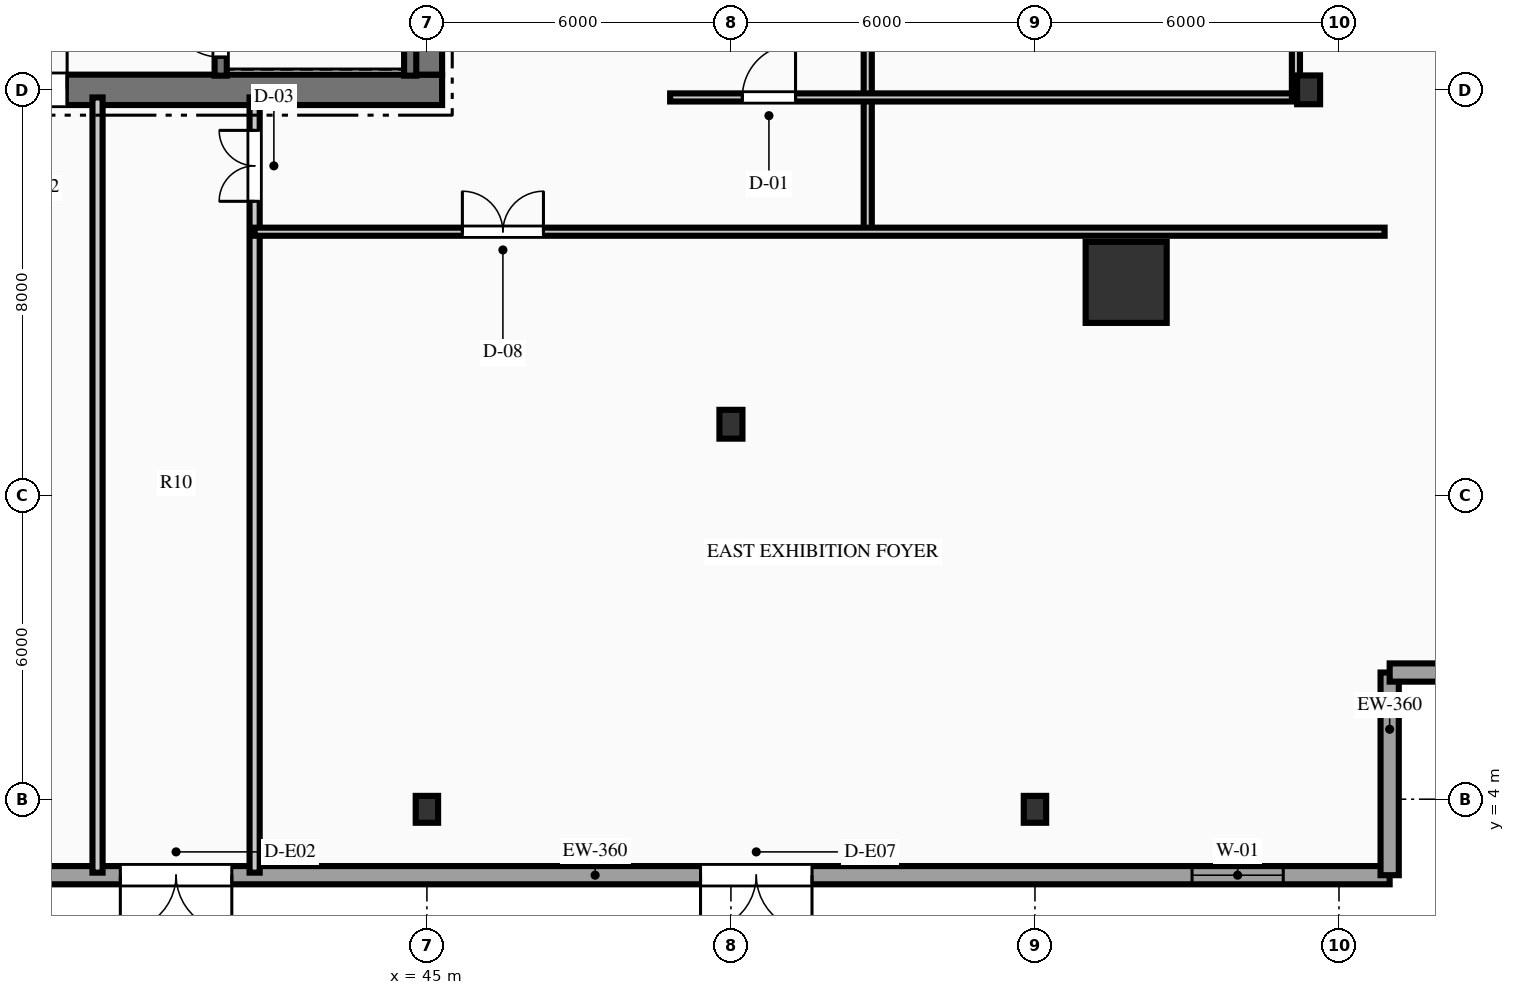
"""IFC4 building model, lengths in metres.
Left out: names, types, materials, properties, quantities, classifications, styles, units other than length and angle.
Written with IfcOpenShell. Run it as: python <this file> out.ifc"""

import sys

from ifc_helpers import new_model, si_unit, direction, frame, frame_2d, origin, origin_2d, place, context, subcontext, project, spatial, rectangle, hollow_rectangle, i_section, extrude, element, fill, save


model = new_model("IFC4")
c1 = context("Model", 3, precision=1e-05, world=origin(), true_north=direction((0.0, 1.0)))
c2 = subcontext(c1, "Body", "Model", "MODEL_VIEW")
j1 = project(units=[si_unit("LENGTHUNIT", "METRE"), si_unit("PLANEANGLEUNIT", "RADIAN")], contexts=[c1])
p1 = place(None, origin())
s1 = spatial("IfcSite", under=j1, at=p1, CompositionType="ELEMENT")
p2 = place(p1, origin())
s2 = spatial("IfcBuilding", under=s1, at=p2, CompositionType="ELEMENT")
p3 = place(p2, origin())
s3 = spatial("IfcBuildingStorey", under=s2, at=p3, CompositionType="ELEMENT", Elevation=0.0)
p4 = place(p3, frame((26.7, 18.0, 0.0), z_axis=(0.0, 0.0, 1.0), x_axis=(1.0, 0.0, 0.0)))
e1 = element("IfcWall", 1, at=p4, inside=s3, PredefinedType="SHEAR", context=c2, shape_type="SweptSolid", body=[
    extrude(rectangle(XDim=18.6, YDim=0.6, at=frame_2d((9.3, 0.0))), origin(), (0.0, 0.0, 1.0), 6.0),
])
p5 = place(p4, frame((7.4, 0.0, 0.0)))
e2 = element("IfcOpeningElement", 2, at=p5, cuts=e1, PredefinedType="OPENING", context=c2, shape_type="SweptSolid", body=[
    extrude(rectangle(XDim=1.1, YDim=2.15, at=frame_2d((0.55, 1.075))), frame((0.0, 0.31, 0.0), z_axis=(0.0, -1.0, 0.0), x_axis=(1.0, 0.0, 0.0)), (0.0, 0.0, 1.0), 0.62),
])
p6 = place(p4, frame((10.1, 0.0, 0.0)))
e3 = element("IfcOpeningElement", 3, at=p6, cuts=e1, PredefinedType="OPENING", context=c2, shape_type="SweptSolid", body=[
    extrude(rectangle(XDim=1.1, YDim=2.15, at=frame_2d((0.55, 1.075))), frame((0.0, 0.31, 0.0), z_axis=(0.0, -1.0, 0.0), x_axis=(1.0, 0.0, 0.0)), (0.0, 0.0, 1.0), 0.62),
])
p7 = place(p3, frame((45.0, 18.3, 0.0), z_axis=(0.0, 0.0, 1.0), x_axis=(0.0, 1.0, 0.0)))
e4 = element("IfcWall", 4, at=p7, inside=s3, PredefinedType="SHEAR", context=c2, shape_type="SweptSolid", body=[
    extrude(rectangle(XDim=15.4, YDim=0.6, at=frame_2d((7.7, 0.0))), origin(), (0.0, 0.0, 1.0), 6.0),
])
p8 = place(p7, frame((9.94, 0.0, 0.0)))
e5 = element("IfcOpeningElement", 5, at=p8, cuts=e4, PredefinedType="OPENING", context=c2, shape_type="SweptSolid", body=[
    extrude(rectangle(XDim=1.4, YDim=2.2, at=frame_2d((0.7, 1.1))), frame((0.0, 0.31, 0.0), z_axis=(0.0, -1.0, 0.0), x_axis=(1.0, 0.0, 0.0)), (0.0, 0.0, 1.0), 0.62),
])
p9 = place(p3, frame((40.93, 18.28, 0.0), z_axis=(0.0, 0.0, 1.0), x_axis=(0.0, 1.0, 0.0)))
e6 = element("IfcWall", 6, at=p9, inside=s3, PredefinedType="SHEAR", context=c2, shape_type="SweptSolid", body=[
    extrude(rectangle(XDim=8.26, YDim=0.24, at=frame_2d((4.13, 0.0))), origin(), (0.0, 0.0, 1.0), 6.0),
])
p10 = place(p9, frame((0.365, 0.0, 0.0)))
e7 = element("IfcOpeningElement", 7, at=p10, cuts=e6, PredefinedType="OPENING", context=c2, shape_type="SweptSolid", body=[
    extrude(rectangle(XDim=1.05, YDim=2.15, at=frame_2d((0.525, 1.075))), frame((0.0, 0.13, 0.0), z_axis=(0.0, -1.0, 0.0), x_axis=(1.0, 0.0, 0.0)), (0.0, 0.0, 1.0), 0.26),
])
p11 = place(p3, frame((44.67, 18.28, 0.0), z_axis=(0.0, 0.0, 1.0), x_axis=(0.0, 1.0, 0.0)))
e8 = element("IfcWall", 8, at=p11, inside=s3, PredefinedType="SHEAR", context=c2, shape_type="SweptSolid", body=[
    extrude(rectangle(XDim=8.26, YDim=0.24, at=frame_2d((4.13, 0.0))), origin(), (0.0, 0.0, 1.0), 6.0),
])
p12 = place(p3, frame((58.8, 14.2, 0.0), z_axis=(0.0, 0.0, 1.0), x_axis=(1.0, 0.0, 0.0)))
e9 = element("IfcColumn", 9, at=p12, inside=s3, PredefinedType="COLUMN", context=c2, shape_type="SweptSolid", body=[
    extrude(hollow_rectangle(XDim=1.6, YDim=1.6, WallThickness=0.08, at=origin_2d()), origin(), (0.0, 0.0, 1.0), 6.0),
])
for number, where, z_axis, x_axis in (
    (10, (62.4, 18.0, 0.0), (0.0, 0.0, 1.0), (1.0, 0.0, 0.0)),
    (11, (51.0, 11.4, 0.0), (0.0, 0.0, 1.0), (1.0, 0.0, 0.0)),
):
    element("IfcColumn", number, at=place(p3, frame(where, z_axis=z_axis, x_axis=x_axis)), inside=s3, PredefinedType="COLUMN", context=c2, shape_type="SweptSolid", body=[
        extrude(i_section(OverallWidth=0.454, OverallDepth=0.569, WebThickness=0.078, FlangeThickness=0.125, at=origin_2d()), origin(), (0.0, 0.0, 1.0), 6.0),
    ])
for number, where, z_axis, x_axis in (
    (12, (45.0, 3.8, 0.0), (0.0, 0.0, 1.0), (1.0, 0.0, 0.0)),
    (13, (57.0, 3.8, 0.0), (0.0, 0.0, 1.0), (1.0, 0.0, 0.0)),
):
    element("IfcColumn", number, at=place(p3, frame(where, z_axis=z_axis, x_axis=x_axis)), inside=s3, PredefinedType="PILASTER", context=c2, shape_type="SweptSolid", body=[
        extrude(i_section(OverallWidth=0.442, OverallDepth=0.531, WebThickness=0.066, FlangeThickness=0.106, at=origin_2d()), origin(), (0.0, 0.0, 1.0), 6.0),
    ])
p13 = place(p3, frame((64.0, 2.5, 0.0), z_axis=(0.0, 0.0, 1.0), x_axis=(-1.0, 0.0, 0.0)))
e14 = element("IfcWall", 14, at=p13, inside=s3, PredefinedType="STANDARD", context=c2, shape_type="SweptSolid", body=[
    extrude(rectangle(XDim=56.0, YDim=0.36, at=frame_2d((28.0, 0.0))), origin(), (0.0, 0.0, 1.0), 5.67),
])
p14 = place(p13, frame((30.95, 0.0, 0.0)))
e15 = element("IfcOpeningElement", 15, at=p14, cuts=e14, PredefinedType="OPENING", context=c2, shape_type="SweptSolid", body=[
    extrude(rectangle(XDim=2.2, YDim=2.4, at=frame_2d((1.1, 1.2))), frame((0.0, 0.19, 0.0), z_axis=(0.0, -1.0, 0.0), x_axis=(1.0, 0.0, 0.0)), (0.0, 0.0, 1.0), 0.38),
])
p15 = place(p13, frame((22.85, 0.0, 0.0)))
e16 = element("IfcOpeningElement", 16, at=p15, cuts=e14, PredefinedType="OPENING", context=c2, shape_type="SweptSolid", body=[
    extrude(rectangle(XDim=2.2, YDim=2.4, at=frame_2d((1.1, 1.2))), frame((0.0, 0.19, 0.0), z_axis=(0.0, -1.0, 0.0), x_axis=(1.0, 0.0, 0.0)), (0.0, 0.0, 1.0), 0.38),
])
p16 = place(p13, frame((42.4, 0.0, 0.0)))
e17 = element("IfcOpeningElement", 17, at=p16, cuts=e14, PredefinedType="OPENING", context=c2, shape_type="SweptSolid", body=[
    extrude(rectangle(XDim=2.2, YDim=2.4, at=frame_2d((1.1, 1.2))), frame((0.0, 0.19, 0.0), z_axis=(0.0, -1.0, 0.0), x_axis=(1.0, 0.0, 0.0)), (0.0, 0.0, 1.0), 0.38),
])
p17 = place(p13, frame((11.4, 0.0, 0.0)))
e18 = element("IfcOpeningElement", 18, at=p17, cuts=e14, PredefinedType="OPENING", context=c2, shape_type="SweptSolid", body=[
    extrude(rectangle(XDim=2.2, YDim=2.4, at=frame_2d((1.1, 1.2))), frame((0.0, 0.19, 0.0), z_axis=(0.0, -1.0, 0.0), x_axis=(1.0, 0.0, 0.0)), (0.0, 0.0, 1.0), 0.38),
])
p18 = place(p13, frame((26.8, 0.0, 0.0)))
e19 = element("IfcOpeningElement", 19, at=p18, cuts=e14, PredefinedType="OPENING", context=c2, shape_type="SweptSolid", body=[
    extrude(rectangle(XDim=2.4, YDim=2.6, at=frame_2d((1.2, 1.3))), frame((0.0, 0.19, 0.0), z_axis=(0.0, -1.0, 0.0), x_axis=(1.0, 0.0, 0.0)), (0.0, 0.0, 1.0), 0.38),
])
p19 = place(p13, frame((52.1, 0.0, 1.0)))
e20 = element("IfcOpeningElement", 20, at=p19, cuts=e14, PredefinedType="OPENING", context=c2, shape_type="SweptSolid", body=[
    extrude(rectangle(XDim=1.8, YDim=2.4, at=frame_2d((0.9, 1.2))), frame((0.0, 0.19, 0.0), z_axis=(0.0, -1.0, 0.0), x_axis=(1.0, 0.0, 0.0)), (0.0, 0.0, 1.0), 0.38),
])
p20 = place(p13, frame((2.1, 0.0, 1.0)))
e21 = element("IfcOpeningElement", 21, at=p20, cuts=e14, PredefinedType="OPENING", context=c2, shape_type="SweptSolid", body=[
    extrude(rectangle(XDim=1.8, YDim=2.4, at=frame_2d((0.9, 1.2))), frame((0.0, 0.19, 0.0), z_axis=(0.0, -1.0, 0.0), x_axis=(1.0, 0.0, 0.0)), (0.0, 0.0, 1.0), 0.38),
])
for number, where, z_axis, x_axis in (
    (22, (64.0, 6.5, 0.0), (0.0, 0.0, 1.0), (0.0, -1.0, 0.0)),
    (23, (68.0, 6.5, 0.0), (0.0, 0.0, 1.0), (-1.0, 0.0, 0.0)),
):
    element("IfcWall", number, at=place(p3, frame(where, z_axis=z_axis, x_axis=x_axis)), inside=s3, PredefinedType="STANDARD", context=c2, shape_type="SweptSolid", body=[
        extrude(rectangle(XDim=4.0, YDim=0.36, at=frame_2d((2.0, 0.0))), origin(), (0.0, 0.0, 1.0), 5.67),
    ])
p21 = place(p3, frame((38.5, 2.55, 0.0), z_axis=(0.0, 0.0, 1.0), x_axis=(0.0, 1.0, 0.0)))
e24 = element("IfcWall", 24, at=p21, inside=s3, PredefinedType="PARTITIONING", context=c2, shape_type="SweptSolid", body=[
    extrude(rectangle(XDim=15.3, YDim=0.2, at=frame_2d((7.65, 0.0))), origin(), (0.0, 0.0, 1.0), 5.67),
])
p22 = place(p3, frame((41.6, 2.55, 0.0), z_axis=(0.0, 0.0, 1.0), x_axis=(0.0, 1.0, 0.0)))
e25 = element("IfcWall", 25, at=p22, inside=s3, PredefinedType="PARTITIONING", context=c2, shape_type="SweptSolid", body=[
    extrude(rectangle(XDim=15.3, YDim=0.2, at=frame_2d((7.65, 0.0))), origin(), (0.0, 0.0, 1.0), 5.67),
])
p23 = place(p22, frame((13.25, 0.0, 0.0)))
e26 = element("IfcOpeningElement", 26, at=p23, cuts=e25, PredefinedType="OPENING", context=c2, shape_type="SweptSolid", body=[
    extrude(rectangle(XDim=1.4, YDim=2.2, at=frame_2d((0.7, 1.1))), frame((0.0, 0.11, 0.0), z_axis=(0.0, -1.0, 0.0), x_axis=(1.0, 0.0, 0.0)), (0.0, 0.0, 1.0), 0.22),
])
p24 = place(p3, frame((53.7, 15.2, 0.0), z_axis=(0.0, 0.0, 1.0), x_axis=(0.0, 1.0, 0.0)))
e27 = element("IfcWall", 27, at=p24, inside=s3, PredefinedType="PARTITIONING", context=c2, shape_type="SweptSolid", body=[
    extrude(rectangle(XDim=2.65, YDim=0.16, at=frame_2d((1.325, 0.0))), origin(), (0.0, 0.0, 1.0), 5.67),
])
p25 = place(p3, frame((53.7, 17.85, 0.0), z_axis=(0.0, 0.0, 1.0), x_axis=(0.0, 1.0, 0.0)))
e28 = element("IfcWall", 28, at=p25, inside=s3, PredefinedType="PARTITIONING", context=c2, shape_type="SweptSolid", body=[
    extrude(rectangle(XDim=3.97, YDim=0.16, at=frame_2d((1.985, 0.0))), origin(), (0.0, 0.0, 1.0), 5.67),
])
p26 = place(p25, frame((1.15, 0.0, 0.0)))
e29 = element("IfcOpeningElement", 29, at=p26, cuts=e28, PredefinedType="OPENING", context=c2, shape_type="SweptSolid", body=[
    extrude(rectangle(XDim=1.6, YDim=2.2, at=frame_2d((0.8, 1.1))), frame((0.0, 0.09, 0.0), z_axis=(0.0, -1.0, 0.0), x_axis=(1.0, 0.0, 0.0)), (0.0, 0.0, 1.0), 0.18),
])
p27 = place(p3, frame((49.8, 17.85, 0.0), z_axis=(0.0, 0.0, 1.0), x_axis=(1.0, 0.0, 0.0)))
e30 = element("IfcWall", 30, at=p27, inside=s3, PredefinedType="PARTITIONING", context=c2, shape_type="SweptSolid", body=[
    extrude(rectangle(XDim=12.35, YDim=0.16, at=frame_2d((6.175, 0.0))), origin(), (0.0, 0.0, 1.0), 4.803),
])
p28 = place(p27, frame((1.425, 0.0, 0.0)))
e31 = element("IfcOpeningElement", 31, at=p28, cuts=e30, PredefinedType="OPENING", context=c2, shape_type="SweptSolid", body=[
    extrude(rectangle(XDim=1.05, YDim=2.15, at=frame_2d((0.525, 1.075))), frame((0.0, 0.09, 0.0), z_axis=(0.0, -1.0, 0.0), x_axis=(1.0, 0.0, 0.0)), (0.0, 0.0, 1.0), 0.18),
])
p29 = place(p3, frame((62.15, 17.85, 0.0), z_axis=(0.0, 0.0, 1.0), x_axis=(0.0, 1.0, 0.0)))
e32 = element("IfcWall", 32, at=p29, inside=s3, PredefinedType="PARTITIONING", context=c2, shape_type="SweptSolid", body=[
    extrude(rectangle(XDim=16.3, YDim=0.16, at=frame_2d((8.15, 0.0))), origin(), (0.0, 0.0, 1.0), 4.803),
])
p30 = place(p29, frame((7.35, 0.0, 0.0)))
e33 = element("IfcOpeningElement", 33, at=p30, cuts=e32, PredefinedType="OPENING", context=c2, shape_type="SweptSolid", body=[
    extrude(rectangle(XDim=1.6, YDim=2.2, at=frame_2d((0.8, 1.1))), frame((0.0, 0.09, 0.0), z_axis=(0.0, -1.0, 0.0), x_axis=(1.0, 0.0, 0.0)), (0.0, 0.0, 1.0), 0.18),
])
p31 = place(p3, frame((41.6, 15.2, 0.0), z_axis=(0.0, 0.0, 1.0), x_axis=(1.0, 0.0, 0.0)))
e34 = element("IfcWall", 34, at=p31, inside=s3, PredefinedType="PARTITIONING", context=c2, shape_type="SweptSolid", body=[
    extrude(rectangle(XDim=22.3, YDim=0.16, at=frame_2d((11.15, 0.0))), origin(), (0.0, 0.0, 1.0), 4.803),
])
p32 = place(p31, frame((4.1, 0.0, 0.0)))
e35 = element("IfcOpeningElement", 35, at=p32, cuts=e34, PredefinedType="OPENING", context=c2, shape_type="SweptSolid", body=[
    extrude(rectangle(XDim=1.6, YDim=2.2, at=frame_2d((0.8, 1.1))), frame((0.0, 0.09, 0.0), z_axis=(0.0, -1.0, 0.0), x_axis=(1.0, 0.0, 0.0)), (0.0, 0.0, 1.0), 0.18),
])
p33 = place(p15, origin())
e36 = element("IfcDoor", 36, at=p33, inside=s3, OperationType="DOUBLE_DOOR_SINGLE_SWING", PredefinedType="DOOR", context=c2, shape_type="SweptSolid", body=[
    extrude(rectangle(XDim=2.2, YDim=2.4, at=frame_2d((1.1, 1.2))), frame((0.0, 0.025, 0.0), z_axis=(0.0, -1.0, 0.0), x_axis=(1.0, 0.0, 0.0)), (0.0, 0.0, 1.0), 0.05),
])
fill(e16, e36)
p34 = place(p17, origin())
e37 = element("IfcDoor", 37, at=p34, inside=s3, OperationType="DOUBLE_DOOR_SINGLE_SWING", PredefinedType="DOOR", context=c2, shape_type="SweptSolid", body=[
    extrude(rectangle(XDim=2.2, YDim=2.4, at=frame_2d((1.1, 1.2))), frame((0.0, 0.025, 0.0), z_axis=(0.0, -1.0, 0.0), x_axis=(1.0, 0.0, 0.0)), (0.0, 0.0, 1.0), 0.05),
])
fill(e18, e37)
p35 = place(p20, origin())
e38 = element("IfcWindow", 38, at=p35, inside=s3, PartitioningType="SINGLE_PANEL", PredefinedType="WINDOW", context=c2, shape_type="SweptSolid", body=[
    extrude(rectangle(XDim=1.8, YDim=2.4, at=frame_2d((0.9, 1.2))), frame((0.0, 0.03, 0.0), z_axis=(0.0, -1.0, 0.0), x_axis=(1.0, 0.0, 0.0)), (0.0, 0.0, 1.0), 0.06),
])
fill(e21, e38)
p36 = place(p10, origin())
e39 = element("IfcDoor", 39, at=p36, inside=s3, OperationType="SINGLE_SWING_RIGHT", PredefinedType="DOOR", context=c2, shape_type="SweptSolid", body=[
    extrude(rectangle(XDim=1.05, YDim=2.15, at=frame_2d((0.525, 1.075))), frame((0.0, 0.025, 0.0), z_axis=(0.0, -1.0, 0.0), x_axis=(1.0, 0.0, 0.0)), (0.0, 0.0, 1.0), 0.05),
])
fill(e7, e39)
p37 = place(p6, origin())
e40 = element("IfcDoor", 40, at=p37, inside=s3, OperationType="SINGLE_SWING_RIGHT", PredefinedType="DOOR", context=c2, shape_type="SweptSolid", body=[
    extrude(rectangle(XDim=1.1, YDim=2.15, at=frame_2d((0.55, 1.075))), frame((0.0, 0.025, 0.0), z_axis=(0.0, -1.0, 0.0), x_axis=(1.0, 0.0, 0.0)), (0.0, 0.0, 1.0), 0.05),
])
fill(e3, e40)
p38 = place(p28, origin())
e41 = element("IfcDoor", 41, at=p38, inside=s3, OperationType="SINGLE_SWING_RIGHT", PredefinedType="DOOR", context=c2, shape_type="SweptSolid", body=[
    extrude(rectangle(XDim=1.05, YDim=2.15, at=frame_2d((0.525, 1.075))), frame((0.0, 0.025, 0.0), z_axis=(0.0, -1.0, 0.0), x_axis=(1.0, 0.0, 0.0)), (0.0, 0.0, 1.0), 0.05),
])
fill(e31, e41)
p39 = place(p23, origin())
e42 = element("IfcDoor", 42, at=p39, inside=s3, OperationType="DOUBLE_DOOR_SINGLE_SWING", PredefinedType="DOOR", context=c2, shape_type="SweptSolid", body=[
    extrude(rectangle(XDim=1.4, YDim=2.2, at=frame_2d((0.7, 1.1))), frame((0.0, 0.025, 0.0), z_axis=(0.0, -1.0, 0.0), x_axis=(1.0, 0.0, 0.0)), (0.0, 0.0, 1.0), 0.05),
])
fill(e26, e42)
p40 = place(p32, origin())
e43 = element("IfcDoor", 43, at=p40, inside=s3, OperationType="DOUBLE_DOOR_SINGLE_SWING", PredefinedType="DOOR", context=c2, shape_type="SweptSolid", body=[
    extrude(rectangle(XDim=1.6, YDim=2.2, at=frame_2d((0.8, 1.1))), frame((0.0, 0.025, 0.0), z_axis=(0.0, -1.0, 0.0), x_axis=(1.0, 0.0, 0.0)), (0.0, 0.0, 1.0), 0.05),
])
fill(e35, e43)
save(model, sys.argv[1])
